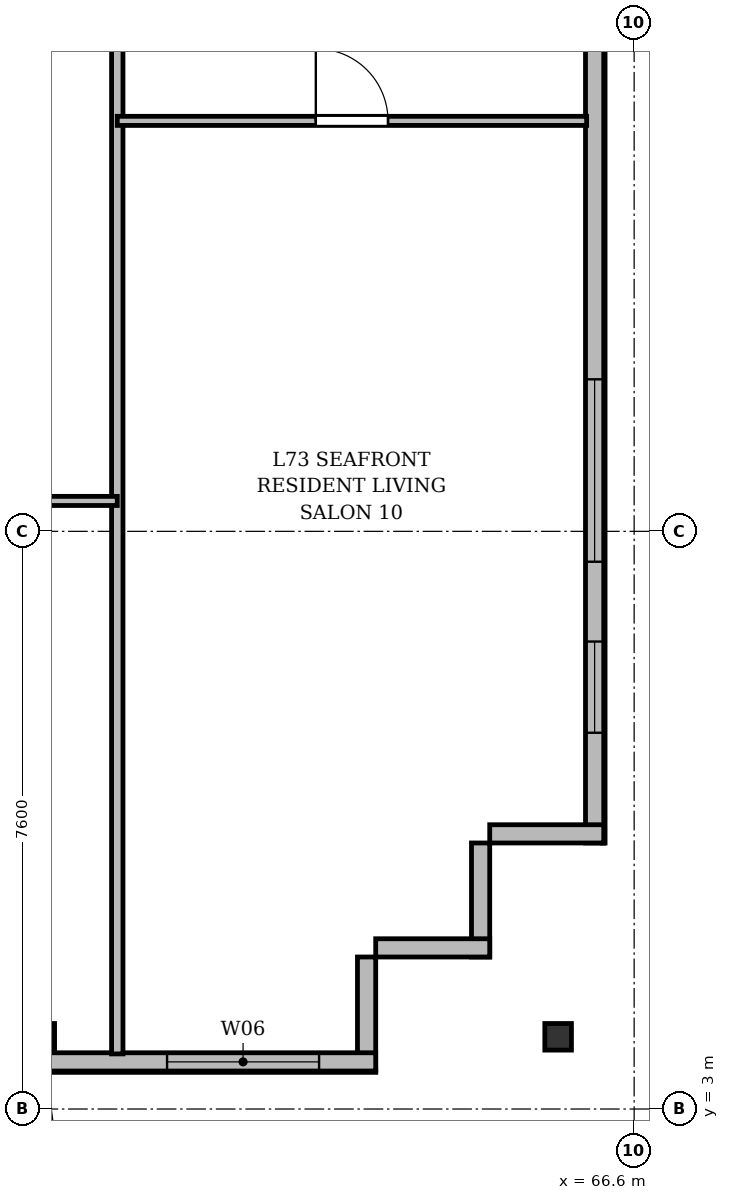
"""IFC4 building model, lengths in metres.
Left out: names, types, materials, properties, quantities, classifications, styles, units other than length and angle.
Written with IfcOpenShell. Run it as: python <this file> out.ifc"""

import sys

from ifc_helpers import new_model, si_unit, direction, frame, frame_2d, origin, origin_2d, place, context, subcontext, project, spatial, rectangle, i_section, extrude, source, transform, mapped, element, fill, save


model = new_model("IFC4")
c1 = context("Model", 3, precision=1e-05, world=origin(), true_north=direction((0.0, 1.0)))
c2 = subcontext(c1, "Body", "Model", "MODEL_VIEW")
j1 = project(units=[si_unit("LENGTHUNIT", "METRE"), si_unit("PLANEANGLEUNIT", "RADIAN")], contexts=[c1])
p1 = place(None, origin())
s1 = spatial("IfcSite", under=j1, at=p1, CompositionType="ELEMENT")
p2 = place(p1, origin())
s2 = spatial("IfcBuilding", under=s1, at=p2, CompositionType="ELEMENT")
p3 = place(p2, frame((0.0, 0.0, 281.1)))
s3 = spatial("IfcBuildingStorey", under=s2, at=p3, CompositionType="ELEMENT", Elevation=281.1)
m1 = source(origin(), c2, "Body", "SweptSolid", [
    extrude(i_section(OverallWidth=0.35, OverallDepth=0.35, WebThickness=0.018, FlangeThickness=0.028, at=origin_2d()), origin(), (0.0, 0.0, 1.0), 3.6),
])
for number, where, z_axis, x_axis in (
    (1, (58.8, 3.95, 0.0), (0.0, 0.0, 1.0), (1.0, 0.0, 0.0)),
    (2, (65.6, 3.95, 0.0), (0.0, 0.0, 1.0), (1.0, 0.0, 0.0)),
):
    element("IfcColumn", number, at=place(p3, frame(where, z_axis=z_axis, x_axis=x_axis)), inside=s3, PredefinedType="COLUMN", context=c2, shape_type="MappedRepresentation", body=[
        mapped(m1, transform((0.0, 0.0, 0.0), x_axis=(1.0, 0.0, 0.0), y_axis=(0.0, 1.0, 0.0), z_axis=(0.0, 0.0, 1.0), scale=1.0)),
    ])
p4 = place(p3, frame((66.08, 45.5, 0.0), z_axis=(0.0, 0.0, 1.0), x_axis=(0.0, -1.0, 0.0)))
e3 = element("IfcWall", 3, at=p4, inside=s3, PredefinedType="SOLIDWALL", context=c2, shape_type="SweptSolid", body=[
    extrude(rectangle(XDim=39.0, YDim=0.24, at=frame_2d((19.5, 0.0))), origin(), (0.0, 0.0, 1.0), 3.37),
])
p5 = place(p4, frame((36.35, 0.0, 0.92)))
e4 = element("IfcOpeningElement", 4, at=p5, cuts=e3, PredefinedType="OPENING", context=c2, shape_type="SweptSolid", body=[
    extrude(rectangle(XDim=1.2, YDim=1.65, at=frame_2d((0.6, 0.825))), frame((0.0, 0.13, 0.0), z_axis=(0.0, -1.0, 0.0), x_axis=(1.0, 0.0, 0.0)), (0.0, 0.0, 1.0), 0.26),
])
p6 = place(p4, frame((32.9, 0.0, 0.92)))
e5 = element("IfcOpeningElement", 5, at=p6, cuts=e3, PredefinedType="OPENING", context=c2, shape_type="SweptSolid", body=[
    extrude(rectangle(XDim=2.4, YDim=2.1, at=frame_2d((1.2, 1.05))), frame((0.0, 0.13, 0.0), z_axis=(0.0, -1.0, 0.0), x_axis=(1.0, 0.0, 0.0)), (0.0, 0.0, 1.0), 0.26),
])
p7 = place(p4, frame((21.5, 0.0, 0.92)))
e6 = element("IfcOpeningElement", 6, at=p7, cuts=e3, PredefinedType="OPENING", context=c2, shape_type="SweptSolid", body=[
    extrude(rectangle(XDim=2.4, YDim=2.1, at=frame_2d((1.2, 1.05))), frame((0.0, 0.13, 0.0), z_axis=(0.0, -1.0, 0.0), x_axis=(1.0, 0.0, 0.0)), (0.0, 0.0, 1.0), 0.26),
])
p8 = place(p4, frame((7.5, 0.0, 0.92)))
e7 = element("IfcOpeningElement", 7, at=p8, cuts=e3, PredefinedType="OPENING", context=c2, shape_type="SweptSolid", body=[
    extrude(rectangle(XDim=2.4, YDim=2.1, at=frame_2d((1.2, 1.05))), frame((0.0, 0.13, 0.0), z_axis=(0.0, -1.0, 0.0), x_axis=(1.0, 0.0, 0.0)), (0.0, 0.0, 1.0), 0.26),
])
p9 = place(p4, frame((1.15, 0.0, 0.92)))
e8 = element("IfcOpeningElement", 8, at=p9, cuts=e3, PredefinedType="OPENING", context=c2, shape_type="SweptSolid", body=[
    extrude(rectangle(XDim=1.2, YDim=1.65, at=frame_2d((0.6, 0.825))), frame((0.0, 0.13, 0.0), z_axis=(0.0, -1.0, 0.0), x_axis=(1.0, 0.0, 0.0)), (0.0, 0.0, 1.0), 0.26),
])
p10 = place(p3, frame((66.2, 6.62, 0.0), z_axis=(0.0, 0.0, 1.0), x_axis=(-1.0, 0.0, 0.0)))
e9 = element("IfcWall", 9, at=p10, inside=s3, PredefinedType="SOLIDWALL", context=c2, shape_type="SweptSolid", body=[
    extrude(rectangle(XDim=1.5, YDim=0.24, at=frame_2d((0.75, 0.0))), origin(), (0.0, 0.0, 1.0), 2.87),
])
for number, where, z_axis, x_axis in (
    (10, (64.58, 6.5, 0.0), (0.0, 0.0, 1.0), (0.0, -1.0, 0.0)),
    (11, (64.7, 5.12, 0.0), (0.0, 0.0, 1.0), (-1.0, 0.0, 0.0)),
):
    element("IfcWall", number, at=place(p3, frame(where, z_axis=z_axis, x_axis=x_axis)), inside=s3, PredefinedType="SOLIDWALL", context=c2, shape_type="SweptSolid", body=[
        extrude(rectangle(XDim=1.5, YDim=0.24, at=frame_2d((0.75, 0.0))), origin(), (0.0, 0.0, 1.0), 3.37),
    ])
p11 = place(p3, frame((63.08, 5.0, 0.0), z_axis=(0.0, 0.0, 1.0), x_axis=(0.0, -1.0, 0.0)))
e12 = element("IfcWall", 12, at=p11, inside=s3, PredefinedType="SOLIDWALL", context=c2, shape_type="SweptSolid", body=[
    extrude(rectangle(XDim=1.5, YDim=0.24, at=frame_2d((0.75, 0.0))), origin(), (0.0, 0.0, 1.0), 2.92),
])
p12 = place(p3, frame((63.2, 3.62, 0.0), z_axis=(0.0, 0.0, 1.0), x_axis=(-1.0, 0.0, 0.0)))
e13 = element("IfcWall", 13, at=p12, inside=s3, PredefinedType="SOLIDWALL", context=c2, shape_type="SweptSolid", body=[
    extrude(rectangle(XDim=52.0, YDim=0.24, at=frame_2d((26.0, 0.0))), origin(), (0.0, 0.0, 1.0), 3.37),
])
p13 = place(p12, frame((0.745, 0.0, 0.9)))
e14 = element("IfcOpeningElement", 14, at=p13, cuts=e13, PredefinedType="OPENING", context=c2, shape_type="SweptSolid", body=[
    extrude(rectangle(XDim=2.0, YDim=1.95, at=frame_2d((1.0, 0.975))), frame((0.0, 0.13, 0.0), z_axis=(0.0, -1.0, 0.0), x_axis=(1.0, 0.0, 0.0)), (0.0, 0.0, 1.0), 0.26),
])
p14 = place(p12, frame((4.793, 0.0, 0.9)))
e15 = element("IfcOpeningElement", 15, at=p14, cuts=e13, PredefinedType="OPENING", context=c2, shape_type="SweptSolid", body=[
    extrude(rectangle(XDim=1.35, YDim=1.5, at=frame_2d((0.675, 0.75))), frame((0.0, 0.13, 0.0), z_axis=(0.0, -1.0, 0.0), x_axis=(1.0, 0.0, 0.0)), (0.0, 0.0, 1.0), 0.26),
])
p15 = place(p12, frame((6.685, 0.0, 0.0)))
e16 = element("IfcOpeningElement", 16, at=p15, cuts=e13, PredefinedType="OPENING", context=c2, shape_type="SweptSolid", body=[
    extrude(rectangle(XDim=1.2, YDim=2.2, at=frame_2d((0.6, 1.1))), frame((0.0, 0.13, 0.0), z_axis=(0.0, -1.0, 0.0), x_axis=(1.0, 0.0, 0.0)), (0.0, 0.0, 1.0), 0.26),
])
p16 = place(p12, frame((9.634, 0.0, 0.9)))
e17 = element("IfcOpeningElement", 17, at=p16, cuts=e13, PredefinedType="OPENING", context=c2, shape_type="SweptSolid", body=[
    extrude(rectangle(XDim=2.2, YDim=1.8, at=frame_2d((1.1, 0.9))), frame((0.0, 0.13, 0.0), z_axis=(0.0, -1.0, 0.0), x_axis=(1.0, 0.0, 0.0)), (0.0, 0.0, 1.0), 0.26),
])
p17 = place(p12, frame((13.45, 0.0, 0.9)))
e18 = element("IfcOpeningElement", 18, at=p17, cuts=e13, PredefinedType="OPENING", context=c2, shape_type="SweptSolid", body=[
    extrude(rectangle(XDim=1.5, YDim=1.75, at=frame_2d((0.75, 0.875))), frame((0.0, 0.13, 0.0), z_axis=(0.0, -1.0, 0.0), x_axis=(1.0, 0.0, 0.0)), (0.0, 0.0, 1.0), 0.26),
])
p18 = place(p12, frame((16.8, 0.0, 0.9)))
e19 = element("IfcOpeningElement", 19, at=p18, cuts=e13, PredefinedType="OPENING", context=c2, shape_type="SweptSolid", body=[
    extrude(rectangle(XDim=2.0, YDim=1.95, at=frame_2d((1.0, 0.975))), frame((0.0, 0.13, 0.0), z_axis=(0.0, -1.0, 0.0), x_axis=(1.0, 0.0, 0.0)), (0.0, 0.0, 1.0), 0.26),
])
p19 = place(p12, frame((21.375, 0.0, 0.9)))
e20 = element("IfcOpeningElement", 20, at=p19, cuts=e13, PredefinedType="OPENING", context=c2, shape_type="SweptSolid", body=[
    extrude(rectangle(XDim=1.65, YDim=1.85, at=frame_2d((0.825, 0.925))), frame((0.0, 0.13, 0.0), z_axis=(0.0, -1.0, 0.0), x_axis=(1.0, 0.0, 0.0)), (0.0, 0.0, 1.0), 0.26),
])
p20 = place(p12, frame((27.9, 0.0, 0.9)))
e21 = element("IfcOpeningElement", 21, at=p20, cuts=e13, PredefinedType="OPENING", context=c2, shape_type="SweptSolid", body=[
    extrude(rectangle(XDim=1.8, YDim=1.8, at=frame_2d((0.9, 0.9))), frame((0.0, 0.13, 0.0), z_axis=(0.0, -1.0, 0.0), x_axis=(1.0, 0.0, 0.0)), (0.0, 0.0, 1.0), 0.26),
])
p21 = place(p12, frame((33.873, 0.0, 0.0)))
e22 = element("IfcOpeningElement", 22, at=p21, cuts=e13, PredefinedType="OPENING", context=c2, shape_type="SweptSolid", body=[
    extrude(rectangle(XDim=1.2, YDim=2.2, at=frame_2d((0.6, 1.1))), frame((0.0, 0.13, 0.0), z_axis=(0.0, -1.0, 0.0), x_axis=(1.0, 0.0, 0.0)), (0.0, 0.0, 1.0), 0.26),
])
p22 = place(p12, frame((37.05, 0.0, 0.9)))
e23 = element("IfcOpeningElement", 23, at=p22, cuts=e13, PredefinedType="OPENING", context=c2, shape_type="SweptSolid", body=[
    extrude(rectangle(XDim=1.5, YDim=1.75, at=frame_2d((0.75, 0.875))), frame((0.0, 0.13, 0.0), z_axis=(0.0, -1.0, 0.0), x_axis=(1.0, 0.0, 0.0)), (0.0, 0.0, 1.0), 0.26),
])
p23 = place(p12, frame((40.3, 0.0, 0.9)))
e24 = element("IfcOpeningElement", 24, at=p23, cuts=e13, PredefinedType="OPENING", context=c2, shape_type="SweptSolid", body=[
    extrude(rectangle(XDim=2.0, YDim=1.95, at=frame_2d((1.0, 0.975))), frame((0.0, 0.13, 0.0), z_axis=(0.0, -1.0, 0.0), x_axis=(1.0, 0.0, 0.0)), (0.0, 0.0, 1.0), 0.26),
])
p24 = place(p12, frame((43.475, 0.0, 0.9)))
e25 = element("IfcOpeningElement", 25, at=p24, cuts=e13, PredefinedType="OPENING", context=c2, shape_type="SweptSolid", body=[
    extrude(rectangle(XDim=1.65, YDim=1.85, at=frame_2d((0.825, 0.925))), frame((0.0, 0.13, 0.0), z_axis=(0.0, -1.0, 0.0), x_axis=(1.0, 0.0, 0.0)), (0.0, 0.0, 1.0), 0.26),
])
p25 = place(p12, frame((45.99, 0.0, 0.9)))
e26 = element("IfcOpeningElement", 26, at=p25, cuts=e13, PredefinedType="OPENING", context=c2, shape_type="SweptSolid", body=[
    extrude(rectangle(XDim=1.2, YDim=1.65, at=frame_2d((0.6, 0.825))), frame((0.0, 0.13, 0.0), z_axis=(0.0, -1.0, 0.0), x_axis=(1.0, 0.0, 0.0)), (0.0, 0.0, 1.0), 0.26),
])
p26 = place(p12, frame((49.255, 0.0, 0.9)))
e27 = element("IfcOpeningElement", 27, at=p26, cuts=e13, PredefinedType="OPENING", context=c2, shape_type="SweptSolid", body=[
    extrude(rectangle(XDim=2.2, YDim=1.8, at=frame_2d((1.1, 0.9))), frame((0.0, 0.13, 0.0), z_axis=(0.0, -1.0, 0.0), x_axis=(1.0, 0.0, 0.0)), (0.0, 0.0, 1.0), 0.26),
])
p27 = place(p3, frame((59.8, 3.725, 0.0), z_axis=(0.0, 0.0, 1.0), x_axis=(0.0, 1.0, 0.0)))
e28 = element("IfcWall", 28, at=p27, inside=s3, PredefinedType="PARTITIONING", context=c2, shape_type="SweptSolid", body=[
    extrude(rectangle(XDim=27.275, YDim=0.15, at=frame_2d((13.637, 0.0))), origin(), (0.0, 0.0, 1.0), 2.92),
])
p28 = place(p3, frame((56.867, 11.0, 0.0), z_axis=(0.0, 0.0, 1.0), x_axis=(1.0, 0.0, 0.0)))
e29 = element("IfcWall", 29, at=p28, inside=s3, PredefinedType="PARTITIONING", context=c2, shape_type="SweptSolid", body=[
    extrude(rectangle(XDim=2.933, YDim=0.12, at=frame_2d((1.467, 0.0))), origin(), (0.0, 0.0, 1.0), 2.87),
])
p29 = place(p28, frame((0.991, 0.0, 0.0)))
e30 = element("IfcOpeningElement", 30, at=p29, cuts=e29, PredefinedType="OPENING", context=c2, shape_type="SweptSolid", body=[
    extrude(rectangle(XDim=0.95, YDim=2.15, at=frame_2d((0.475, 1.075))), frame((0.0, 0.07, 0.0), z_axis=(0.0, -1.0, 0.0), x_axis=(1.0, 0.0, 0.0)), (0.0, 0.0, 1.0), 0.14),
])
p30 = place(p3, frame((59.8, 16.0, 0.0), z_axis=(0.0, 0.0, 1.0), x_axis=(1.0, 0.0, 0.0)))
e31 = element("IfcWall", 31, at=p30, inside=s3, PredefinedType="PARTITIONING", context=c2, shape_type="SweptSolid", body=[
    extrude(rectangle(XDim=6.175, YDim=0.12, at=frame_2d((3.087, 0.0))), origin(), (0.0, 0.0, 1.0), 2.87),
])
p31 = place(p30, frame((2.612, 0.0, 0.0)))
e32 = element("IfcOpeningElement", 32, at=p31, cuts=e31, PredefinedType="OPENING", context=c2, shape_type="SweptSolid", body=[
    extrude(rectangle(XDim=0.95, YDim=2.15, at=frame_2d((0.475, 1.075))), frame((0.0, 0.07, 0.0), z_axis=(0.0, -1.0, 0.0), x_axis=(1.0, 0.0, 0.0)), (0.0, 0.0, 1.0), 0.14),
])
m2 = source(origin(), c2, "Body", "SweptSolid", [
    extrude(rectangle(XDim=1.2, YDim=1.65, at=frame_2d((0.6, 0.825))), frame((0.0, 0.03, 0.0), z_axis=(0.0, -1.0, 0.0), x_axis=(1.0, 0.0, 0.0)), (0.0, 0.0, 1.0), 0.06),
])
p32 = place(p5, origin())
e33 = element("IfcWindow", 33, at=p32, inside=s3, PartitioningType="SINGLE_PANEL", PredefinedType="WINDOW", context=c2, shape_type="MappedRepresentation", body=[
    mapped(m2, transform((0.0, 0.0, 0.0), x_axis=(1.0, 0.0, 0.0), y_axis=(0.0, 1.0, 0.0), z_axis=(0.0, 0.0, 1.0), scale=1.0)),
])
fill(e4, e33)
m3 = source(origin(), c2, "Body", "SweptSolid", [
    extrude(rectangle(XDim=2.4, YDim=2.1, at=frame_2d((1.2, 1.05))), frame((0.0, 0.03, 0.0), z_axis=(0.0, -1.0, 0.0), x_axis=(1.0, 0.0, 0.0)), (0.0, 0.0, 1.0), 0.06),
])
p33 = place(p6, origin())
e34 = element("IfcWindow", 34, at=p33, inside=s3, PartitioningType="SINGLE_PANEL", PredefinedType="WINDOW", context=c2, shape_type="MappedRepresentation", body=[
    mapped(m3, transform((0.0, 0.0, 0.0), x_axis=(1.0, 0.0, 0.0), y_axis=(0.0, 1.0, 0.0), z_axis=(0.0, 0.0, 1.0), scale=1.0)),
])
fill(e5, e34)
m4 = source(origin(), c2, "Body", "SweptSolid", [
    extrude(rectangle(XDim=2.0, YDim=1.95, at=frame_2d((1.0, 0.975))), frame((0.0, 0.03, 0.0), z_axis=(0.0, -1.0, 0.0), x_axis=(1.0, 0.0, 0.0)), (0.0, 0.0, 1.0), 0.06),
])
p34 = place(p13, origin())
e35 = element("IfcWindow", 35, at=p34, inside=s3, PartitioningType="SINGLE_PANEL", PredefinedType="WINDOW", context=c2, shape_type="MappedRepresentation", body=[
    mapped(m4, transform((0.0, 0.0, 0.0), x_axis=(1.0, 0.0, 0.0), y_axis=(0.0, 1.0, 0.0), z_axis=(0.0, 0.0, 1.0), scale=1.0)),
])
fill(e14, e35)
m5 = source(origin(), c2, "Body", "SweptSolid", [
    extrude(rectangle(XDim=0.95, YDim=2.15, at=frame_2d((0.475, 1.075))), frame((0.0, 0.025, 0.0), z_axis=(0.0, -1.0, 0.0), x_axis=(1.0, 0.0, 0.0)), (0.0, 0.0, 1.0), 0.05),
])
p35 = place(p31, origin())
e36 = element("IfcDoor", 36, at=p35, inside=s3, OperationType="SINGLE_SWING_LEFT", PredefinedType="DOOR", context=c2, shape_type="MappedRepresentation", body=[
    mapped(m5, transform((0.0, 0.0, 0.0), x_axis=(1.0, 0.0, 0.0), y_axis=(0.0, 1.0, 0.0), z_axis=(0.0, 0.0, 1.0), scale=1.0)),
])
fill(e32, e36)
save(model, sys.argv[1])
